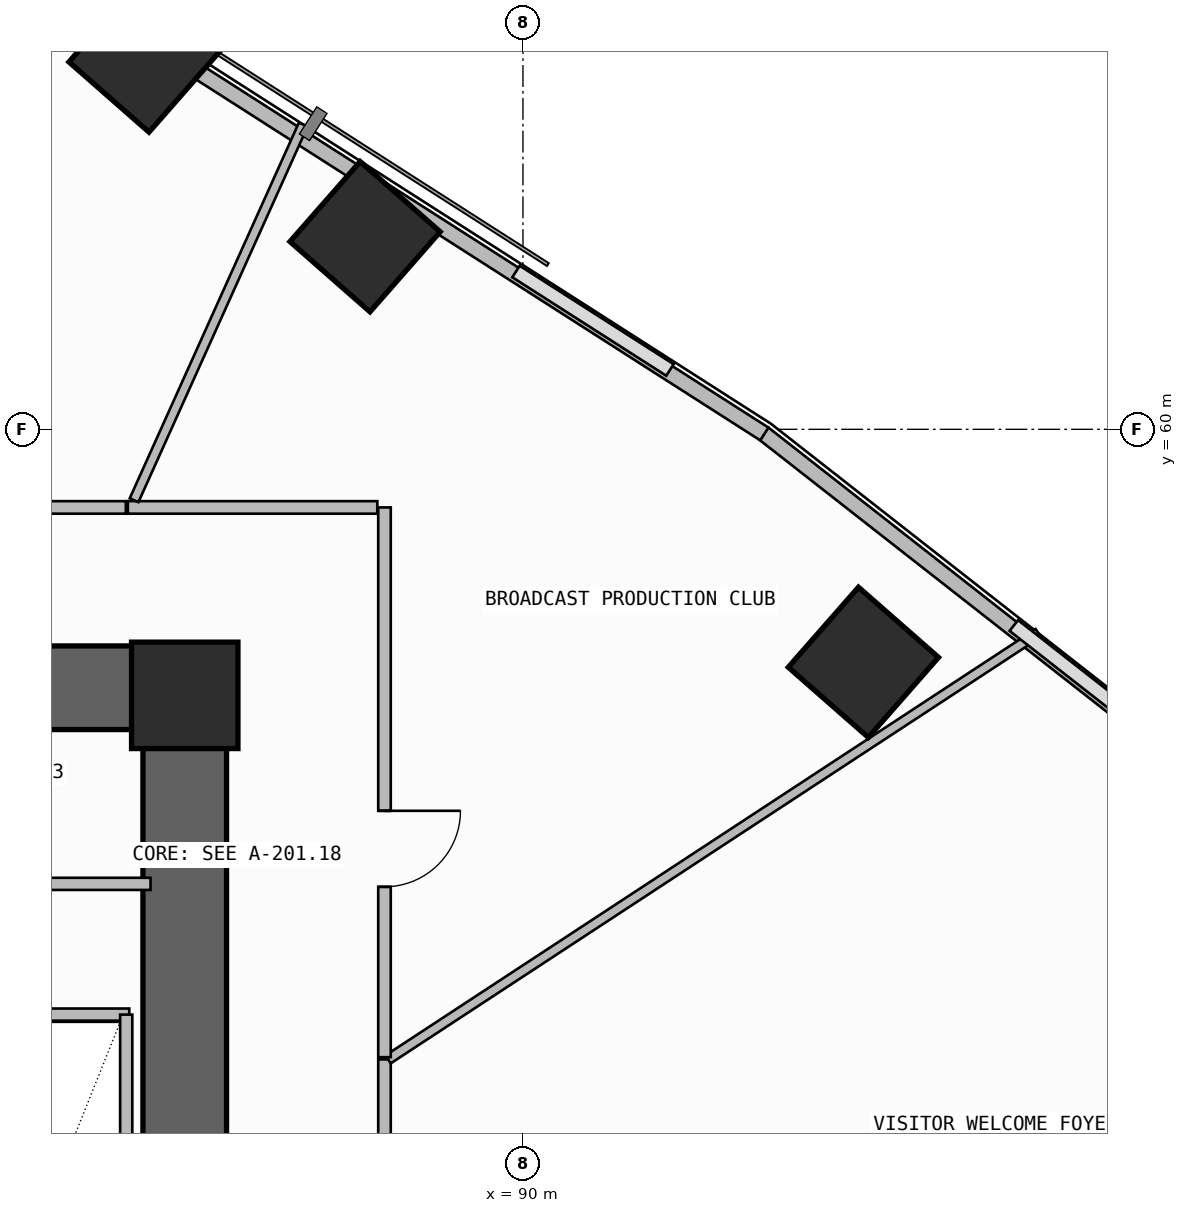
"""IFC4 building model, lengths in metres.
Left out: names, types, materials, properties, quantities, classifications, styles, units other than length and angle.
Written with IfcOpenShell. Run it as: python <this file> out.ifc"""

import sys

from ifc_helpers import new_model, si_unit, direction, frame, frame_2d, origin, origin_2d, place, context, subcontext, project, spatial, rectangle, extrude, element, fill, save


model = new_model("IFC4")
c1 = context("Model", 3, precision=1e-05, world=origin(), true_north=direction((0.0, 1.0)))
c2 = subcontext(c1, "Body", "Model", "MODEL_VIEW")
j1 = project(units=[si_unit("LENGTHUNIT", "METRE"), si_unit("PLANEANGLEUNIT", "RADIAN")], contexts=[c1])
p1 = place(None, origin())
s1 = spatial("IfcSite", under=j1, at=p1, CompositionType="ELEMENT")
p2 = place(p1, origin())
s2 = spatial("IfcBuilding", under=s1, at=p2, CompositionType="ELEMENT")
p3 = place(p2, frame((0.0, 0.0, 63.3)))
s3 = spatial("IfcBuildingStorey", under=s2, at=p3, CompositionType="ELEMENT", Elevation=63.3)
p4 = place(p3, frame((71.8, 56.6, -0.4), z_axis=(0.0, 0.0, 1.0), x_axis=(1.0, 0.0, 0.0)))
e1 = element("IfcWall", 1, at=p4, inside=s3, PredefinedType="SHEAR", context=c2, shape_type="SweptSolid", body=[
    extrude(rectangle(XDim=14.3, YDim=1.1, at=frame_2d((7.15, 0.0))), origin(), (0.0, 0.0, 1.0), 3.74),
])
p5 = place(p3, frame((85.55, 47.6, -0.4), z_axis=(0.0, 0.0, 1.0), x_axis=(0.0, 1.0, 0.0)))
e2 = element("IfcWall", 2, at=p5, inside=s3, PredefinedType="SHEAR", context=c2, shape_type="SweptSolid", body=[
    extrude(rectangle(XDim=8.45, YDim=1.1, at=frame_2d((4.225, 0.0))), origin(), (0.0, 0.0, 1.0), 3.74),
])
p6 = place(p3, frame((85.55, 56.5, 0.0), z_axis=(0.0, 0.0, 1.0), x_axis=(1.0, 0.0, 0.0)))
e3 = element("IfcColumn", 3, at=p6, inside=s3, PredefinedType="COLUMN", context=c2, shape_type="SweptSolid", body=[
    extrude(rectangle(XDim=1.4, YDim=1.4, at=origin_2d()), origin(), (0.0, 0.0, 1.0), 3.6),
])
for number, where, z_axis, x_axis in (
    (4, (94.479, 56.935, -0.4), (0.0, 0.0, 1.0), (0.659, 0.752, 0.0)),
    (5, (87.923, 62.534, -0.4), (0.0, 0.0, 1.0), (0.659, 0.752, 0.0)),
    (6, (85.015, 64.898, -0.4), (0.0, 0.0, 1.0), (0.659, 0.752, 0.0)),
):
    element("IfcColumn", number, at=place(p3, frame(where, z_axis=z_axis, x_axis=x_axis)), inside=s3, PredefinedType="COLUMN", context=c2, shape_type="SweptSolid", body=[
        extrude(rectangle(XDim=1.4, YDim=1.4, at=origin_2d()), origin(), (0.0, 0.0, 1.0), 4.0),
    ])
p7 = place(p3, frame((121.476, 37.781, 0.0), z_axis=(0.0, 0.0, 1.0), x_axis=(-0.787385636484, 0.61646075257, 0.0)))
e7 = element("IfcWall", 7, at=p7, inside=s3, PredefinedType="PARAPET", context=c2, shape_type="SweptSolid", body=[
    extrude(rectangle(XDim=35.957, YDim=0.2, at=frame_2d((17.979, 0.0))), origin(), (0.0, 0.0, 1.0), 1.15),
])
p8 = place(p3, frame((93.176, 59.939, 0.0), z_axis=(0.0, 0.0, 1.0), x_axis=(-0.842413081081, 0.538832256666, 0.0)))
e8 = element("IfcWall", 8, at=p8, inside=s3, PredefinedType="PARAPET", context=c2, shape_type="SweptSolid", body=[
    extrude(rectangle(XDim=9.011, YDim=0.2, at=frame_2d((4.505, 0.0))), origin(), (0.0, 0.0, 1.0), 1.15),
])
p9 = place(p3, frame((80.6, 52.3, 0.0), z_axis=(0.0, 0.0, 1.0), x_axis=(1.0, 0.0, 0.0)))
e9 = element("IfcWall", 9, at=p9, inside=s3, PredefinedType="SOLIDWALL", context=c2, shape_type="SweptSolid", body=[
    extrude(rectangle(XDim=4.22, YDim=0.16, at=frame_2d((2.11, 0.0))), origin(), (0.0, 0.0, 1.0), 3.34),
])
p10 = place(p3, frame((84.78, 47.7, 0.0), z_axis=(0.0, 0.0, 1.0), x_axis=(0.0, 1.0, 0.0)))
e10 = element("IfcWall", 10, at=p10, inside=s3, PredefinedType="SOLIDWALL", context=c2, shape_type="SweptSolid", body=[
    extrude(rectangle(XDim=4.6, YDim=0.16, at=frame_2d((2.3, 0.0))), origin(), (0.0, 0.0, 1.0), 3.34),
])
p11 = place(p3, frame((73.02, 54.02, 0.0), z_axis=(0.0, 0.0, 1.0), x_axis=(1.0, 0.0, 0.0)))
e11 = element("IfcWall", 11, at=p11, inside=s3, PredefinedType="SOLIDWALL", context=c2, shape_type="SweptSolid", body=[
    extrude(rectangle(XDim=12.08, YDim=0.16, at=frame_2d((6.04, 0.0))), origin(), (0.0, 0.0, 1.0), 3.34),
])
p12 = place(p3, frame((88.178, 45.681, 0.0), z_axis=(0.0, 0.0, 1.0), x_axis=(0.0, 1.0, 0.0)))
e12 = element("IfcWall", 12, at=p12, inside=s3, PredefinedType="PARTITIONING", context=c2, shape_type="SweptSolid", body=[
    extrude(rectangle(XDim=6.03, YDim=0.165, at=frame_2d((3.015, 0.0))), origin(), (0.0, 0.0, 1.0), 3.34),
])
p13 = place(p12, frame((2.515, 0.0, 0.0)))
e13 = element("IfcOpeningElement", 13, at=p13, cuts=e12, PredefinedType="OPENING", context=c2, shape_type="SweptSolid", body=[
    extrude(rectangle(XDim=1.0, YDim=2.2, at=frame_2d((0.5, 1.1))), frame((0.0, 0.093, 0.0), z_axis=(0.0, -1.0, 0.0), x_axis=(1.0, 0.0, 0.0)), (0.0, 0.0, 1.0), 0.185),
])
p14 = place(p3, frame((88.226, 51.711, 0.0), z_axis=(0.0, 0.0, 1.0), x_axis=(0.83621278641, 0.548405120185, 0.0)))
e14 = element("IfcWall", 14, at=p14, inside=s3, PredefinedType="PARTITIONING", context=c2, shape_type="SweptSolid", body=[
    extrude(rectangle(XDim=10.229, YDim=0.125, at=frame_2d((5.114, 0.0))), origin(), (0.0, 0.0, 1.0), 2.725),
])
p15 = place(p3, frame((88.178, 51.74, 0.0), z_axis=(0.0, 0.0, 1.0), x_axis=(0.0, 1.0, 0.0)))
e15 = element("IfcWall", 15, at=p15, inside=s3, PredefinedType="PARTITIONING", context=c2, shape_type="SweptSolid", body=[
    extrude(rectangle(XDim=7.233, YDim=0.165, at=frame_2d((3.616, 0.0))), origin(), (0.0, 0.0, 1.0), 2.725),
])
p16 = place(p15, frame((2.241, 0.0, 0.0)))
e16 = element("IfcOpeningElement", 16, at=p16, cuts=e15, PredefinedType="OPENING", context=c2, shape_type="SweptSolid", body=[
    extrude(rectangle(XDim=1.0, YDim=2.2, at=frame_2d((0.5, 1.1))), frame((0.0, 0.093, 0.0), z_axis=(0.0, -1.0, 0.0), x_axis=(1.0, 0.0, 0.0)), (0.0, 0.0, 1.0), 0.185),
])
p17 = place(p3, frame((88.083, 58.972, 0.0), z_axis=(0.0, 0.0, 1.0), x_axis=(-1.0, 0.0, 0.0)))
e17 = element("IfcWall", 17, at=p17, inside=s3, PredefinedType="PARTITIONING", context=c2, shape_type="SweptSolid", body=[
    extrude(rectangle(XDim=3.282, YDim=0.165, at=frame_2d((1.641, 0.0))), origin(), (0.0, 0.0, 1.0), 2.725),
])
p18 = place(p3, frame((84.883, 59.067, 0.0), z_axis=(0.0, 0.0, 1.0), x_axis=(0.41061747733, 0.911807703033, 0.0)))
e18 = element("IfcWall", 18, at=p18, inside=s3, PredefinedType="PARTITIONING", context=c2, shape_type="SweptSolid", body=[
    extrude(rectangle(XDim=5.421, YDim=0.125, at=frame_2d((2.71, 0.0))), origin(), (0.0, 0.0, 1.0), 2.725),
])
p19 = place(p3, frame((84.775, 58.972, 0.0), z_axis=(0.0, 0.0, 1.0), x_axis=(-1.0, 0.0, 0.0)))
e19 = element("IfcWall", 19, at=p19, inside=s3, PredefinedType="PARTITIONING", context=c2, shape_type="SweptSolid", body=[
    extrude(rectangle(XDim=7.986, YDim=0.165, at=frame_2d((3.993, 0.0))), origin(), (0.0, 0.0, 1.0), 3.34),
])
p20 = place(p19, frame((3.493, 0.0, 0.0)))
e20 = element("IfcOpeningElement", 20, at=p20, cuts=e19, PredefinedType="OPENING", context=c2, shape_type="SweptSolid", body=[
    extrude(rectangle(XDim=1.0, YDim=2.2, at=frame_2d((0.5, 1.1))), frame((0.0, 0.093, 0.0), z_axis=(0.0, -1.0, 0.0), x_axis=(1.0, 0.0, 0.0)), (0.0, 0.0, 1.0), 0.185),
])
p21 = place(p16, frame((1.0, 0.0, 0.0), z_axis=(0.0, 0.0, 1.0), x_axis=(-1.0, 0.0, 0.0)))
e21 = element("IfcDoor", 21, at=p21, inside=s3, OperationType="SINGLE_SWING_LEFT", PredefinedType="DOOR", context=c2, shape_type="SweptSolid", body=[
    extrude(rectangle(XDim=1.0, YDim=2.2, at=frame_2d((0.5, 1.1))), frame((0.0, 0.025, 0.0), z_axis=(0.0, -1.0, 0.0), x_axis=(1.0, 0.0, 0.0)), (0.0, 0.0, 1.0), 0.05),
])
fill(e16, e21)
save(model, sys.argv[1])
